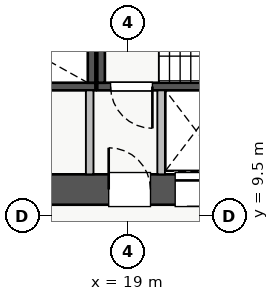
"""IFC4 building model, lengths in metres.
Left out: names, types, materials, properties, quantities, classifications, styles, units other than length and angle.
Written with IfcOpenShell. Run it as: python <this file> out.ifc"""

import sys

from ifc_helpers import new_model, si_unit, direction, frame, frame_2d, origin, place, context, subcontext, project, spatial, rectangle, extrude, source, transform, mapped, element, fill, save


model = new_model("IFC4")
c1 = context("Model", 3, precision=1e-05, world=origin(), true_north=direction((0.0, 1.0)))
c2 = subcontext(c1, "Body", "Model", "MODEL_VIEW")
j1 = project(units=[si_unit("LENGTHUNIT", "METRE"), si_unit("PLANEANGLEUNIT", "RADIAN")], contexts=[c1])
p1 = place(None, origin())
s1 = spatial("IfcSite", under=j1, at=p1, CompositionType="ELEMENT")
p2 = place(p1, origin())
s2 = spatial("IfcBuilding", under=s1, at=p2, CompositionType="ELEMENT")
p3 = place(p2, frame((0.0, 0.0, 42.5)))
s3 = spatial("IfcBuildingStorey", under=s2, at=p3, CompositionType="ELEMENT", Elevation=42.5)
p4 = place(p3, frame((19.88, 12.8, 0.0), z_axis=(0.0, 0.0, 1.0), x_axis=(1.0, 0.0, 0.0)))
e1 = element("IfcWall", 1, at=p4, inside=s3, PredefinedType="SHEAR", context=c2, shape_type="SweptSolid", body=[
    extrude(rectangle(XDim=1.87, YDim=0.18, at=frame_2d((0.935, 0.0))), origin(), (0.0, 0.0, 1.0), 3.03),
])
p5 = place(p3, frame((11.0, 12.91, 0.0), z_axis=(0.0, 0.0, 1.0), x_axis=(1.0, 0.0, 0.0)))
e2 = element("IfcWall", 2, at=p5, inside=s3, PredefinedType="SHEAR", context=c2, shape_type="SweptSolid", body=[
    extrude(rectangle(XDim=7.15, YDim=0.2, at=frame_2d((3.575, 0.0))), origin(), (0.0, 0.0, 1.0), 3.25),
])
p6 = place(p5, frame((0.35, 0.0, 0.0)))
e3 = element("IfcOpeningElement", 3, at=p6, cuts=e2, PredefinedType="OPENING", context=c2, shape_type="SweptSolid", body=[
    extrude(rectangle(XDim=1.1, YDim=2.05, at=frame_2d((0.55, 1.025))), frame((0.0, 0.11, 0.0), z_axis=(0.0, -1.0, 0.0), x_axis=(1.0, 0.0, 0.0)), (0.0, 0.0, 1.0), 0.22),
])
p7 = place(p3, frame((18.05, 13.01, 0.0), z_axis=(0.0, 0.0, 1.0), x_axis=(0.0, 1.0, 0.0)))
e4 = element("IfcWall", 4, at=p7, inside=s3, PredefinedType="SHEAR", context=c2, shape_type="SweptSolid", body=[
    extrude(rectangle(XDim=2.94, YDim=0.2, at=frame_2d((1.47, 0.0))), origin(), (0.0, 0.0, 1.0), 3.25),
])
p8 = place(p3, frame((18.2, 12.91, 0.0), z_axis=(0.0, 0.0, 1.0), x_axis=(1.0, 0.0, 0.0)))
e5 = element("IfcWall", 5, at=p8, inside=s3, PredefinedType="SHEAR", context=c2, shape_type="SweptSolid", body=[
    extrude(rectangle(XDim=7.15, YDim=0.2, at=frame_2d((3.575, 0.0))), origin(), (0.0, 0.0, 1.0), 3.25),
])
p9 = place(p8, frame((0.35, 0.0, 0.0)))
e6 = element("IfcOpeningElement", 6, at=p9, cuts=e5, PredefinedType="OPENING", context=c2, shape_type="SweptSolid", body=[
    extrude(rectangle(XDim=1.1, YDim=2.05, at=frame_2d((0.55, 1.025))), frame((0.0, 0.11, 0.0), z_axis=(0.0, -1.0, 0.0), x_axis=(1.0, 0.0, 0.0)), (0.0, 0.0, 1.0), 0.22),
])
p10 = place(p3, frame((18.3, 13.01, 0.0), z_axis=(0.0, 0.0, 1.0), x_axis=(0.0, 1.0, 0.0)))
e7 = element("IfcWall", 7, at=p10, inside=s3, PredefinedType="SHEAR", context=c2, shape_type="SweptSolid", body=[
    extrude(rectangle(XDim=2.94, YDim=0.2, at=frame_2d((1.47, 0.0))), origin(), (0.0, 0.0, 1.0), 3.25),
])
p11 = place(p3, frame((10.2, 10.2, 0.0), z_axis=(0.0, 0.0, 1.0), x_axis=(1.0, 0.0, 0.0)))
e8 = element("IfcWall", 8, at=p11, inside=s3, PredefinedType="SHEAR", context=c2, shape_type="SweptSolid", body=[
    extrude(rectangle(XDim=17.6, YDim=0.8, at=frame_2d((8.8, 0.0))), origin(), (0.0, 0.0, 1.0), 3.25),
])
p12 = place(p11, frame((1.15, 0.0, 0.0)))
e9 = element("IfcOpeningElement", 9, at=p12, cuts=e8, PredefinedType="OPENING", context=c2, shape_type="SweptSolid", body=[
    extrude(rectangle(XDim=1.1, YDim=2.05, at=frame_2d((0.55, 1.025))), frame((0.0, 0.41, 0.0), z_axis=(0.0, -1.0, 0.0), x_axis=(1.0, 0.0, 0.0)), (0.0, 0.0, 1.0), 0.82),
])
p13 = place(p11, frame((8.3, 0.0, 0.0)))
e10 = element("IfcOpeningElement", 10, at=p13, cuts=e8, PredefinedType="OPENING", context=c2, shape_type="SweptSolid", body=[
    extrude(rectangle(XDim=1.1, YDim=2.05, at=frame_2d((0.55, 1.025))), frame((0.0, 0.41, 0.0), z_axis=(0.0, -1.0, 0.0), x_axis=(1.0, 0.0, 0.0)), (0.0, 0.0, 1.0), 0.82),
])
p14 = place(p11, frame((10.05, 0.0, 0.0)))
e11 = element("IfcOpeningElement", 11, at=p14, cuts=e8, PredefinedType="OPENING", context=c2, shape_type="SweptSolid", body=[
    extrude(rectangle(XDim=1.1, YDim=2.05, at=frame_2d((0.55, 1.025))), frame((0.0, 0.41, 0.0), z_axis=(0.0, -1.0, 0.0), x_axis=(1.0, 0.0, 0.0)), (0.0, 0.0, 1.0), 0.82),
])
p15 = place(p11, frame((14.74, 0.0, 0.0)))
e12 = element("IfcOpeningElement", 12, at=p15, cuts=e8, PredefinedType="OPENING", context=c2, shape_type="SweptSolid", body=[
    extrude(rectangle(XDim=1.0, YDim=2.05, at=frame_2d((0.5, 1.025))), frame((0.0, 0.41, 0.0), z_axis=(0.0, -1.0, 0.0), x_axis=(1.0, 0.0, 0.0)), (0.0, 0.0, 1.0), 0.82),
])
p16 = place(p11, frame((11.835, 0.0, 0.0)))
e13 = element("IfcOpeningElement", 13, at=p16, cuts=e8, PredefinedType="OPENING", context=c2, shape_type="SweptSolid", body=[
    extrude(rectangle(XDim=1.0, YDim=2.05, at=frame_2d((0.5, 1.025))), frame((0.0, 0.41, 0.0), z_axis=(0.0, -1.0, 0.0), x_axis=(1.0, 0.0, 0.0)), (0.0, 0.0, 1.0), 0.82),
])
p17 = place(p11, frame((13.37, 0.0, 0.0)))
e14 = element("IfcOpeningElement", 14, at=p17, cuts=e8, PredefinedType="OPENING", context=c2, shape_type="SweptSolid", body=[
    extrude(rectangle(XDim=1.0, YDim=2.05, at=frame_2d((0.5, 1.025))), frame((0.0, 0.41, 0.0), z_axis=(0.0, -1.0, 0.0), x_axis=(1.0, 0.0, 0.0)), (0.0, 0.0, 1.0), 0.82),
])
for number, where, z_axis, x_axis in (
    (15, (18.0, 10.6, 0.0), (0.0, 0.0, 1.0), (0.0, 1.0, 0.0)),
    (16, (19.88, 10.6, 0.0), (0.0, 0.0, 1.0), (0.0, 1.0, 0.0)),
):
    element("IfcWall", number, at=place(p3, frame(where, z_axis=z_axis, x_axis=x_axis)), inside=s3, PredefinedType="PARTITIONING", context=c2, shape_type="SweptSolid", body=[
        extrude(rectangle(XDim=2.21, YDim=0.2, at=frame_2d((1.105, 0.0))), origin(), (0.0, 0.0, 1.0), 3.03),
    ])
m1 = source(origin(), c2, "Body", "SweptSolid", [
    extrude(rectangle(XDim=1.1, YDim=2.05, at=frame_2d((0.55, 1.025))), frame((0.0, 0.025, 0.0), z_axis=(0.0, -1.0, 0.0), x_axis=(1.0, 0.0, 0.0)), (0.0, 0.0, 1.0), 0.05),
])
p18 = place(p13, origin())
e17 = element("IfcDoor", 17, at=p18, inside=s3, OperationType="SINGLE_SWING_LEFT", PredefinedType="DOOR", context=c2, shape_type="MappedRepresentation", body=[
    mapped(m1, transform((0.0, 0.0, 0.0), x_axis=(1.0, 0.0, 0.0), y_axis=(0.0, 1.0, 0.0), z_axis=(0.0, 0.0, 1.0), scale=1.0)),
])
fill(e10, e17)
p19 = place(p9, frame((1.1, 0.0, 0.0), z_axis=(0.0, 0.0, 1.0), x_axis=(-1.0, 0.0, 0.0)))
e18 = element("IfcDoor", 18, at=p19, inside=s3, OperationType="SINGLE_SWING_RIGHT", PredefinedType="DOOR", context=c2, shape_type="MappedRepresentation", body=[
    mapped(m1, transform((0.0, 0.0, 0.0), x_axis=(1.0, 0.0, 0.0), y_axis=(0.0, 1.0, 0.0), z_axis=(0.0, 0.0, 1.0), scale=1.0)),
])
fill(e6, e18)
p20 = place(p14, origin())
e19 = element("IfcDoor", 19, at=p20, inside=s3, OperationType="SLIDING_TO_RIGHT", PredefinedType="DOOR", context=c2, shape_type="MappedRepresentation", body=[
    mapped(m1, transform((0.0, 0.0, 0.0), x_axis=(1.0, 0.0, 0.0), y_axis=(0.0, 1.0, 0.0), z_axis=(0.0, 0.0, 1.0), scale=1.0)),
])
fill(e11, e19)
save(model, sys.argv[1])
